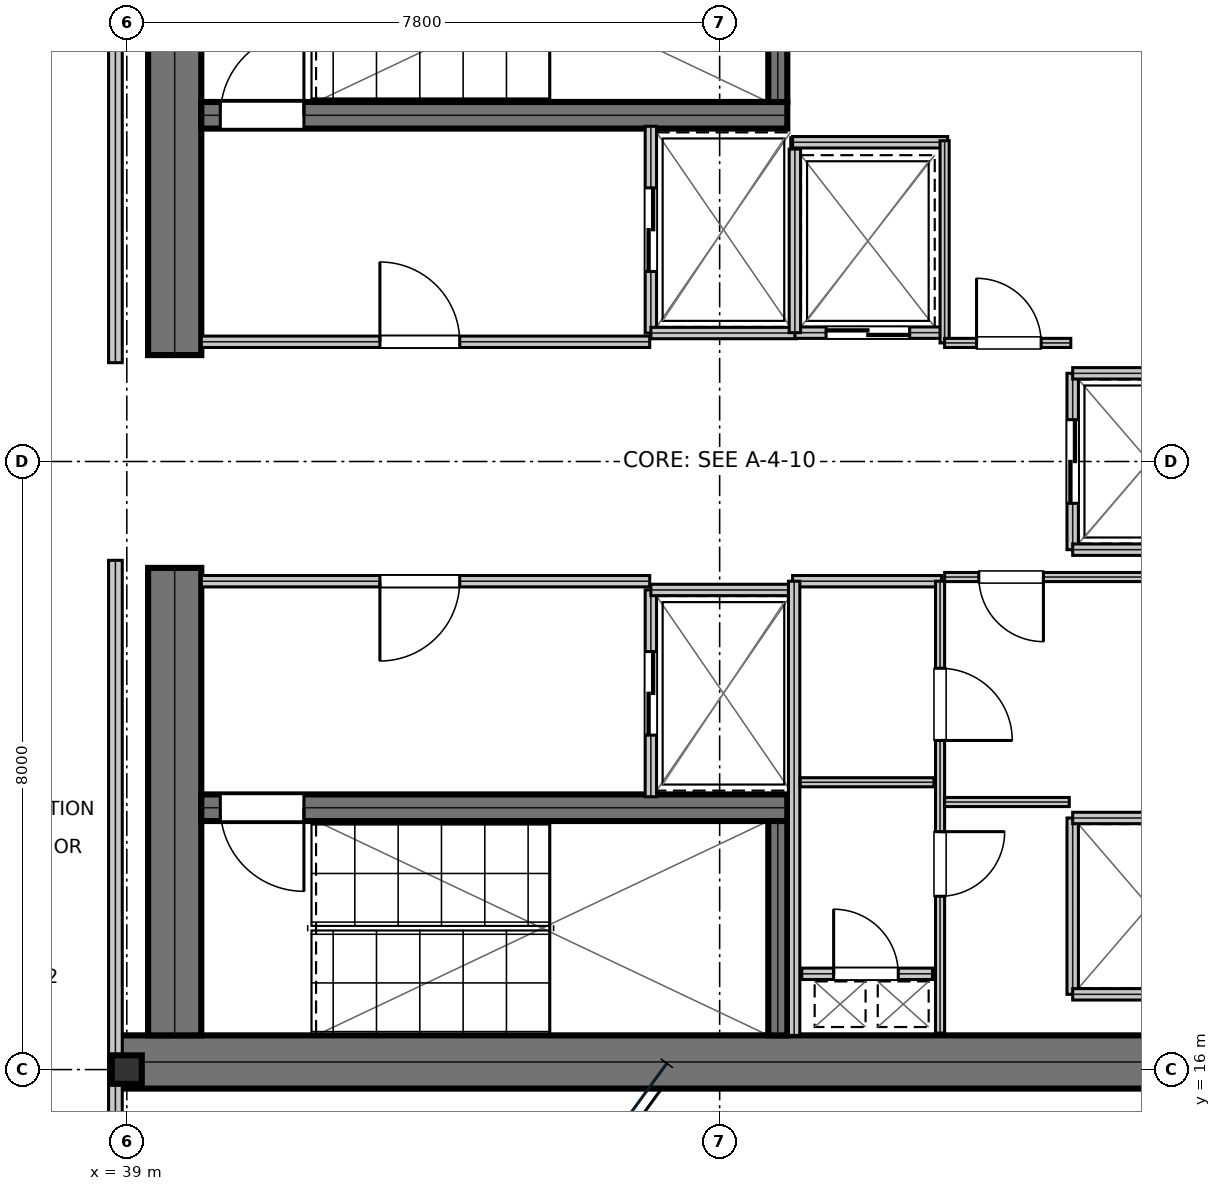
"""IFC4 building model, lengths in metres.
Left out: names, types, materials, properties, quantities, classifications, styles, units other than length and angle.
Written with IfcOpenShell. Run it as: python <this file> out.ifc"""

import sys

from ifc_helpers import new_model, si_unit, direction, frame, frame_2d, origin, origin_2d, place, context, subcontext, project, spatial, rectangle, i_section, extrude, element, fill, save


model = new_model("IFC4")
c1 = context("Model", 3, precision=1e-05, world=origin(), true_north=direction((0.0, 1.0)))
c2 = subcontext(c1, "Body", "Model", "MODEL_VIEW")
j1 = project(units=[si_unit("LENGTHUNIT", "METRE"), si_unit("PLANEANGLEUNIT", "RADIAN")], contexts=[c1])
p1 = place(None, origin())
s1 = spatial("IfcSite", under=j1, at=p1, CompositionType="ELEMENT")
p2 = place(p1, origin())
s2 = spatial("IfcBuilding", under=s1, at=p2, CompositionType="ELEMENT")
p3 = place(p2, frame((0.0, 0.0, 228.3)))
s3 = spatial("IfcBuildingStorey", under=s2, at=p3, CompositionType="ELEMENT", Elevation=228.3)
p4 = place(p3, frame((38.8, 16.1, 0.0), z_axis=(0.0, 0.0, 1.0), x_axis=(1.0, 0.0, 0.0)))
e1 = element("IfcWall", 1, at=p4, inside=s3, PredefinedType="SHEAR", context=c2, shape_type="SweptSolid", body=[
    extrude(rectangle(XDim=16.0, YDim=0.7, at=frame_2d((8.0, 0.0))), origin(), (0.0, 0.0, 1.0), 3.79),
])
for number, where, z_axis, x_axis in (
    (2, (39.63, 16.45, 0.0), (0.0, 0.0, 1.0), (0.0, 1.0, 0.0)),
    (3, (39.63, 25.4, 0.0), (0.0, 0.0, 1.0), (0.0, 1.0, 0.0)),
):
    element("IfcWall", number, at=place(p3, frame(where, z_axis=z_axis, x_axis=x_axis)), inside=s3, PredefinedType="SHEAR", context=c2, shape_type="SweptSolid", body=[
        extrude(rectangle(XDim=6.15, YDim=0.7, at=frame_2d((3.075, 0.0))), origin(), (0.0, 0.0, 1.0), 3.79),
    ])
p5 = place(p3, frame((39.98, 28.555, 0.0), z_axis=(0.0, 0.0, 1.0), x_axis=(1.0, 0.0, 0.0)))
e4 = element("IfcWall", 4, at=p5, inside=s3, PredefinedType="SHEAR", context=c2, shape_type="SweptSolid", body=[
    extrude(rectangle(XDim=7.71, YDim=0.35, at=frame_2d((3.855, 0.0))), origin(), (0.0, 0.0, 1.0), 3.79),
])
p6 = place(p5, frame((0.25, 0.0, 0.0)))
e5 = element("IfcOpeningElement", 5, at=p6, cuts=e4, PredefinedType="OPENING", context=c2, shape_type="SweptSolid", body=[
    extrude(rectangle(XDim=1.1, YDim=2.15, at=frame_2d((0.55, 1.075))), frame((0.0, 0.185, 0.0), z_axis=(0.0, -1.0, 0.0), x_axis=(1.0, 0.0, 0.0)), (0.0, 0.0, 1.0), 0.37),
])
p7 = place(p3, frame((39.98, 19.445, 0.0), z_axis=(0.0, 0.0, 1.0), x_axis=(1.0, 0.0, 0.0)))
e6 = element("IfcWall", 6, at=p7, inside=s3, PredefinedType="SHEAR", context=c2, shape_type="SweptSolid", body=[
    extrude(rectangle(XDim=7.71, YDim=0.35, at=frame_2d((3.855, 0.0))), origin(), (0.0, 0.0, 1.0), 3.79),
])
p8 = place(p7, frame((0.25, 0.0, 0.0)))
e7 = element("IfcOpeningElement", 7, at=p8, cuts=e6, PredefinedType="OPENING", context=c2, shape_type="SweptSolid", body=[
    extrude(rectangle(XDim=1.1, YDim=2.15, at=frame_2d((0.55, 1.075))), frame((0.0, 0.185, 0.0), z_axis=(0.0, -1.0, 0.0), x_axis=(1.0, 0.0, 0.0)), (0.0, 0.0, 1.0), 0.37),
])
for number, where, z_axis, x_axis in (
    (8, (47.565, 28.73, 0.0), (0.0, 0.0, 1.0), (0.0, 1.0, 0.0)),
    (9, (47.565, 16.45, 0.0), (0.0, 0.0, 1.0), (0.0, 1.0, 0.0)),
):
    element("IfcWall", number, at=place(p3, frame(where, z_axis=z_axis, x_axis=x_axis)), inside=s3, PredefinedType="SHEAR", context=c2, shape_type="SweptSolid", body=[
        extrude(rectangle(XDim=2.82, YDim=0.25, at=frame_2d((1.41, 0.0))), origin(), (0.0, 0.0, 1.0), 3.79),
    ])
p9 = place(p3, frame((39.0, 16.0, 0.0), z_axis=(0.0, 0.0, 1.0), x_axis=(1.0, 0.0, 0.0)))
e10 = element("IfcColumn", 10, at=p9, inside=s3, PredefinedType="COLUMN", context=c2, shape_type="SweptSolid", body=[
    extrude(i_section(OverallWidth=0.394, OverallDepth=0.375, WebThickness=0.017, FlangeThickness=0.028, at=origin_2d()), origin(), (0.0, 0.0, 1.0), 4.044),
])
p10 = place(p3, frame((39.98, 25.575, 0.0), z_axis=(0.0, 0.0, 1.0), x_axis=(1.0, 0.0, 0.0)))
e11 = element("IfcWall", 11, at=p10, inside=s3, PredefinedType="PARTITIONING", context=c2, shape_type="SweptSolid", body=[
    extrude(rectangle(XDim=5.9, YDim=0.15, at=frame_2d((2.95, 0.0))), origin(), (0.0, 0.0, 1.0), 3.79),
])
p11 = place(p10, frame((2.35, 0.0, 0.0)))
e12 = element("IfcOpeningElement", 12, at=p11, cuts=e11, PredefinedType="OPENING", context=c2, shape_type="SweptSolid", body=[
    extrude(rectangle(XDim=1.05, YDim=2.15, at=frame_2d((0.525, 1.075))), frame((0.0, 0.085, 0.0), z_axis=(0.0, -1.0, 0.0), x_axis=(1.0, 0.0, 0.0)), (0.0, 0.0, 1.0), 0.17),
])
p12 = place(p3, frame((39.98, 22.425, 0.0), z_axis=(0.0, 0.0, 1.0), x_axis=(1.0, 0.0, 0.0)))
e13 = element("IfcWall", 13, at=p12, inside=s3, PredefinedType="PARTITIONING", context=c2, shape_type="SweptSolid", body=[
    extrude(rectangle(XDim=5.9, YDim=0.15, at=frame_2d((2.95, 0.0))), origin(), (0.0, 0.0, 1.0), 3.79),
])
p13 = place(p12, frame((2.35, 0.0, 0.0)))
e14 = element("IfcOpeningElement", 14, at=p13, cuts=e13, PredefinedType="OPENING", context=c2, shape_type="SweptSolid", body=[
    extrude(rectangle(XDim=1.05, YDim=2.15, at=frame_2d((0.525, 1.075))), frame((0.0, 0.085, 0.0), z_axis=(0.0, -1.0, 0.0), x_axis=(1.0, 0.0, 0.0)), (0.0, 0.0, 1.0), 0.17),
])
p14 = place(p3, frame((45.895, 25.69, 0.0), z_axis=(0.0, 0.0, 1.0), x_axis=(0.0, 1.0, 0.0)))
e15 = element("IfcWall", 15, at=p14, inside=s3, PredefinedType="PARTITIONING", context=c2, shape_type="SweptSolid", body=[
    extrude(rectangle(XDim=2.72, YDim=0.15, at=frame_2d((1.36, 0.0))), origin(), (0.0, 0.0, 1.0), 3.79),
])
p15 = place(p14, frame((0.81, 0.0, 0.0)))
e16 = element("IfcOpeningElement", 16, at=p15, cuts=e15, PredefinedType="OPENING", context=c2, shape_type="SweptSolid", body=[
    extrude(rectangle(XDim=1.1, YDim=2.15, at=frame_2d((0.55, 1.075))), frame((0.0, 0.085, 0.0), z_axis=(0.0, -1.0, 0.0), x_axis=(1.0, 0.0, 0.0)), (0.0, 0.0, 1.0), 0.17),
])
p16 = place(p3, frame((45.895, 25.69, 0.0), z_axis=(0.0, 0.0, 1.0), x_axis=(1.0, 0.0, 0.0)))
e17 = element("IfcWall", 17, at=p16, inside=s3, PredefinedType="PARTITIONING", context=c2, shape_type="SweptSolid", body=[
    extrude(rectangle(XDim=1.915, YDim=0.15, at=frame_2d((0.958, 0.0))), origin(), (0.0, 0.0, 1.0), 3.79),
])
p17 = place(p3, frame((45.895, 19.59, 0.0), z_axis=(0.0, 0.0, 1.0), x_axis=(0.0, 1.0, 0.0)))
e18 = element("IfcWall", 18, at=p17, inside=s3, PredefinedType="PARTITIONING", context=c2, shape_type="SweptSolid", body=[
    extrude(rectangle(XDim=2.72, YDim=0.15, at=frame_2d((1.36, 0.0))), origin(), (0.0, 0.0, 1.0), 3.79),
])
p18 = place(p17, frame((0.81, 0.0, 0.0)))
e19 = element("IfcOpeningElement", 19, at=p18, cuts=e18, PredefinedType="OPENING", context=c2, shape_type="SweptSolid", body=[
    extrude(rectangle(XDim=1.1, YDim=2.15, at=frame_2d((0.55, 1.075))), frame((0.0, 0.085, 0.0), z_axis=(0.0, -1.0, 0.0), x_axis=(1.0, 0.0, 0.0)), (0.0, 0.0, 1.0), 0.17),
])
p19 = place(p3, frame((45.895, 22.31, 0.0), z_axis=(0.0, 0.0, 1.0), x_axis=(1.0, 0.0, 0.0)))
e20 = element("IfcWall", 20, at=p19, inside=s3, PredefinedType="PARTITIONING", context=c2, shape_type="SweptSolid", body=[
    extrude(rectangle(XDim=1.915, YDim=0.15, at=frame_2d((0.958, 0.0))), origin(), (0.0, 0.0, 1.0), 3.79),
])
p20 = place(p3, frame((47.79, 25.695, 0.0), z_axis=(0.0, 0.0, 1.0), x_axis=(1.0, 0.0, 0.0)))
e21 = element("IfcWall", 21, at=p20, inside=s3, PredefinedType="PARTITIONING", context=c2, shape_type="SweptSolid", body=[
    extrude(rectangle(XDim=1.92, YDim=0.15, at=frame_2d((0.96, 0.0))), origin(), (0.0, 0.0, 1.0), 3.79),
])
p21 = place(p20, frame((0.41, 0.0, 0.0)))
e22 = element("IfcOpeningElement", 22, at=p21, cuts=e21, PredefinedType="OPENING", context=c2, shape_type="SweptSolid", body=[
    extrude(rectangle(XDim=1.1, YDim=2.15, at=frame_2d((0.55, 1.075))), frame((0.0, 0.085, 0.0), z_axis=(0.0, -1.0, 0.0), x_axis=(1.0, 0.0, 0.0)), (0.0, 0.0, 1.0), 0.17),
])
p22 = place(p3, frame((47.79, 25.695, 0.0), z_axis=(0.0, 0.0, 1.0), x_axis=(0.0, 1.0, 0.0)))
e23 = element("IfcWall", 23, at=p22, inside=s3, PredefinedType="PARTITIONING", context=c2, shape_type="SweptSolid", body=[
    extrude(rectangle(XDim=2.415, YDim=0.15, at=frame_2d((1.208, 0.0))), origin(), (0.0, 0.0, 1.0), 3.79),
])
p23 = place(p3, frame((51.445, 22.84, 0.0), z_axis=(0.0, 0.0, 1.0), x_axis=(0.0, 1.0, 0.0)))
e24 = element("IfcWall", 24, at=p23, inside=s3, PredefinedType="PARTITIONING", context=c2, shape_type="SweptSolid", body=[
    extrude(rectangle(XDim=2.32, YDim=0.15, at=frame_2d((1.16, 0.0))), origin(), (0.0, 0.0, 1.0), 3.79),
])
p24 = place(p23, frame((0.61, 0.0, 0.0)))
e25 = element("IfcOpeningElement", 25, at=p24, cuts=e24, PredefinedType="OPENING", context=c2, shape_type="SweptSolid", body=[
    extrude(rectangle(XDim=1.1, YDim=2.15, at=frame_2d((0.55, 1.075))), frame((0.0, 0.085, 0.0), z_axis=(0.0, -1.0, 0.0), x_axis=(1.0, 0.0, 0.0)), (0.0, 0.0, 1.0), 0.17),
])
for number, where, z_axis, x_axis in (
    (26, (51.445, 22.84, 0.0), (0.0, 0.0, 1.0), (1.0, 0.0, 0.0)),
    (27, (51.445, 25.16, 0.0), (0.0, 0.0, 1.0), (1.0, 0.0, 0.0)),
):
    element("IfcWall", number, at=place(p3, frame(where, z_axis=z_axis, x_axis=x_axis)), inside=s3, PredefinedType="PARTITIONING", context=c2, shape_type="SweptSolid", body=[
        extrude(rectangle(XDim=2.015, YDim=0.15, at=frame_2d((1.007, 0.0))), origin(), (0.0, 0.0, 1.0), 3.79),
    ])
p25 = place(p3, frame((51.445, 16.99, 0.0), z_axis=(0.0, 0.0, 1.0), x_axis=(0.0, 1.0, 0.0)))
e28 = element("IfcWall", 28, at=p25, inside=s3, PredefinedType="PARTITIONING", context=c2, shape_type="SweptSolid", body=[
    extrude(rectangle(XDim=2.32, YDim=0.15, at=frame_2d((1.16, 0.0))), origin(), (0.0, 0.0, 1.0), 3.79),
])
for number, where, z_axis, x_axis in (
    (29, (51.445, 16.99, 0.0), (0.0, 0.0, 1.0), (1.0, 0.0, 0.0)),
    (30, (51.445, 19.31, 0.0), (0.0, 0.0, 1.0), (1.0, 0.0, 0.0)),
):
    element("IfcWall", number, at=place(p3, frame(where, z_axis=z_axis, x_axis=x_axis)), inside=s3, PredefinedType="PARTITIONING", context=c2, shape_type="SweptSolid", body=[
        extrude(rectangle(XDim=2.015, YDim=0.15, at=frame_2d((1.007, 0.0))), origin(), (0.0, 0.0, 1.0), 3.79),
    ])
p26 = place(p3, frame((47.88, 17.26, 0.0), z_axis=(0.0, 0.0, 1.0), x_axis=(1.0, 0.0, 0.0)))
e31 = element("IfcWall", 31, at=p26, inside=s3, PredefinedType="PARTITIONING", context=c2, shape_type="SweptSolid", body=[
    extrude(rectangle(XDim=1.72, YDim=0.15, at=frame_2d((0.86, 0.0))), origin(), (0.0, 0.0, 1.0), 3.79),
])
p27 = place(p26, frame((0.42, 0.0, 0.0)))
e32 = element("IfcOpeningElement", 32, at=p27, cuts=e31, PredefinedType="OPENING", context=c2, shape_type="SweptSolid", body=[
    extrude(rectangle(XDim=0.85, YDim=2.15, at=frame_2d((0.425, 1.075))), frame((0.0, 0.085, 0.0), z_axis=(0.0, -1.0, 0.0), x_axis=(1.0, 0.0, 0.0)), (0.0, 0.0, 1.0), 0.17),
])
p28 = place(p3, frame((47.76, 22.425, 0.0), z_axis=(0.0, 0.0, 1.0), x_axis=(1.0, 0.0, 0.0)))
e33 = element("IfcWall", 33, at=p28, inside=s3, PredefinedType="PARTITIONING", context=c2, shape_type="SweptSolid", body=[
    extrude(rectangle(XDim=1.96, YDim=0.15, at=frame_2d((0.98, 0.0))), origin(), (0.0, 0.0, 1.0), 3.79),
])
p29 = place(p3, frame((47.78, 16.45, 0.0), z_axis=(0.0, 0.0, 1.0), x_axis=(0.0, 1.0, 0.0)))
e34 = element("IfcWall", 34, at=p29, inside=s3, PredefinedType="PARTITIONING", context=c2, shape_type="SweptSolid", body=[
    extrude(rectangle(XDim=5.975, YDim=0.15, at=frame_2d((2.988, 0.0))), origin(), (0.0, 0.0, 1.0), 3.79),
])
p30 = place(p3, frame((47.86, 19.78, 0.0), z_axis=(0.0, 0.0, 1.0), x_axis=(1.0, 0.0, 0.0)))
e35 = element("IfcWall", 35, at=p30, inside=s3, PredefinedType="PARTITIONING", context=c2, shape_type="SweptSolid", body=[
    extrude(rectangle(XDim=1.76, YDim=0.12, at=frame_2d((0.88, 0.0))), origin(), (0.0, 0.0, 1.0), 3.79),
])
p31 = place(p3, frame((49.7, 16.48, 0.0), z_axis=(0.0, 0.0, 1.0), x_axis=(0.0, 1.0, 0.0)))
e36 = element("IfcWall", 36, at=p31, inside=s3, PredefinedType="PARTITIONING", context=c2, shape_type="SweptSolid", body=[
    extrude(rectangle(XDim=5.945, YDim=0.12, at=frame_2d((2.973, 0.0))), origin(), (0.0, 0.0, 1.0), 3.79),
])
p32 = place(p31, frame((1.8, 0.0, 0.0)))
e37 = element("IfcOpeningElement", 37, at=p32, cuts=e36, PredefinedType="OPENING", context=c2, shape_type="SweptSolid", body=[
    extrude(rectangle(XDim=0.85, YDim=2.15, at=frame_2d((0.425, 1.075))), frame((0.0, 0.07, 0.0), z_axis=(0.0, -1.0, 0.0), x_axis=(1.0, 0.0, 0.0)), (0.0, 0.0, 1.0), 0.14),
])
p33 = place(p31, frame((3.85, 0.0, 0.0)))
e38 = element("IfcOpeningElement", 38, at=p33, cuts=e36, PredefinedType="OPENING", context=c2, shape_type="SweptSolid", body=[
    extrude(rectangle(XDim=0.95, YDim=2.15, at=frame_2d((0.475, 1.075))), frame((0.0, 0.07, 0.0), z_axis=(0.0, -1.0, 0.0), x_axis=(1.0, 0.0, 0.0)), (0.0, 0.0, 1.0), 0.14),
])
p34 = place(p3, frame((49.76, 22.48, 0.0), z_axis=(0.0, 0.0, 1.0), x_axis=(1.0, 0.0, 0.0)))
e39 = element("IfcWall", 39, at=p34, inside=s3, PredefinedType="PARTITIONING", context=c2, shape_type="SweptSolid", body=[
    extrude(rectangle(XDim=3.9, YDim=0.12, at=frame_2d((1.95, 0.0))), origin(), (0.0, 0.0, 1.0), 3.79),
])
p35 = place(p34, frame((0.45, 0.0, 0.0)))
e40 = element("IfcOpeningElement", 40, at=p35, cuts=e39, PredefinedType="OPENING", context=c2, shape_type="SweptSolid", body=[
    extrude(rectangle(XDim=0.85, YDim=2.15, at=frame_2d((0.425, 1.075))), frame((0.0, 0.07, 0.0), z_axis=(0.0, -1.0, 0.0), x_axis=(1.0, 0.0, 0.0)), (0.0, 0.0, 1.0), 0.14),
])
p36 = place(p3, frame((49.76, 19.52, 0.0), z_axis=(0.0, 0.0, 1.0), x_axis=(1.0, 0.0, 0.0)))
e41 = element("IfcWall", 41, at=p36, inside=s3, PredefinedType="PARTITIONING", context=c2, shape_type="SweptSolid", body=[
    extrude(rectangle(XDim=1.64, YDim=0.12, at=frame_2d((0.82, 0.0))), origin(), (0.0, 0.0, 1.0), 3.79),
])
p37 = place(p3, frame((47.76, 28.2, 0.0), z_axis=(0.0, 0.0, 1.0), x_axis=(1.0, 0.0, 0.0)))
e42 = element("IfcWall", 42, at=p37, inside=s3, PredefinedType="PARTITIONING", context=c2, shape_type="SweptSolid", body=[
    extrude(rectangle(XDim=2.04, YDim=0.15, at=frame_2d((1.02, 0.0))), origin(), (0.0, 0.0, 1.0), 3.79),
])
p38 = place(p3, frame((49.76, 25.56, 0.0), z_axis=(0.0, 0.0, 1.0), x_axis=(0.0, 1.0, 0.0)))
e43 = element("IfcWall", 43, at=p38, inside=s3, PredefinedType="PARTITIONING", context=c2, shape_type="SweptSolid", body=[
    extrude(rectangle(XDim=2.66, YDim=0.12, at=frame_2d((1.33, 0.0))), origin(), (0.0, 0.0, 1.0), 3.79),
])
p39 = place(p3, frame((49.76, 25.56, 0.0), z_axis=(0.0, 0.0, 1.0), x_axis=(1.0, 0.0, 0.0)))
e44 = element("IfcWall", 44, at=p39, inside=s3, PredefinedType="PARTITIONING", context=c2, shape_type="SweptSolid", body=[
    extrude(rectangle(XDim=1.66, YDim=0.12, at=frame_2d((0.83, 0.0))), origin(), (0.0, 0.0, 1.0), 3.79),
])
p40 = place(p39, frame((0.42, 0.0, 0.0)))
e45 = element("IfcOpeningElement", 45, at=p40, cuts=e44, PredefinedType="OPENING", context=c2, shape_type="SweptSolid", body=[
    extrude(rectangle(XDim=0.85, YDim=2.15, at=frame_2d((0.425, 1.075))), frame((0.0, 0.07, 0.0), z_axis=(0.0, -1.0, 0.0), x_axis=(1.0, 0.0, 0.0)), (0.0, 0.0, 1.0), 0.14),
])
for number, where, z_axis, x_axis in (
    (46, (38.85, 14.5, 0.0), (0.0, 0.0, 1.0), (0.0, 1.0, 0.0)),
    (47, (38.85, 25.3, 0.0), (0.0, 0.0, 1.0), (0.0, 1.0, 0.0)),
):
    element("IfcWall", number, at=place(p3, frame(where, z_axis=z_axis, x_axis=x_axis)), inside=s3, PredefinedType="SOLIDWALL", context=c2, shape_type="SweptSolid", body=[
        extrude(rectangle(XDim=8.2, YDim=0.18, at=frame_2d((4.1, 0.0))), origin(), (0.0, 0.0, 1.0), 3.241),
    ])
p41 = place(p11, origin())
e48 = element("IfcDoor", 48, at=p41, inside=s3, OperationType="SINGLE_SWING_LEFT", PredefinedType="DOOR", context=c2, shape_type="SweptSolid", body=[
    extrude(rectangle(XDim=1.05, YDim=2.15, at=frame_2d((0.525, 1.075))), frame((0.0, 0.025, 0.0), z_axis=(0.0, -1.0, 0.0), x_axis=(1.0, 0.0, 0.0)), (0.0, 0.0, 1.0), 0.05),
])
fill(e12, e48)
p42 = place(p13, frame((1.05, 0.0, 0.0), z_axis=(0.0, 0.0, 1.0), x_axis=(-1.0, 0.0, 0.0)))
e49 = element("IfcDoor", 49, at=p42, inside=s3, OperationType="SINGLE_SWING_RIGHT", PredefinedType="DOOR", context=c2, shape_type="SweptSolid", body=[
    extrude(rectangle(XDim=1.05, YDim=2.15, at=frame_2d((0.525, 1.075))), frame((0.0, 0.025, 0.0), z_axis=(0.0, -1.0, 0.0), x_axis=(1.0, 0.0, 0.0)), (0.0, 0.0, 1.0), 0.05),
])
fill(e14, e49)
p43 = place(p15, frame((1.1, 0.0, 0.0), z_axis=(0.0, 0.0, 1.0), x_axis=(-1.0, 0.0, 0.0)))
e50 = element("IfcDoor", 50, at=p43, inside=s3, OperationType="DOUBLE_DOOR_SLIDING", PredefinedType="DOOR", context=c2, shape_type="SweptSolid", body=[
    extrude(rectangle(XDim=1.1, YDim=2.15, at=frame_2d((0.55, 1.075))), frame((0.0, 0.025, 0.0), z_axis=(0.0, -1.0, 0.0), x_axis=(1.0, 0.0, 0.0)), (0.0, 0.0, 1.0), 0.05),
])
fill(e16, e50)
p44 = place(p18, frame((1.1, 0.0, 0.0), z_axis=(0.0, 0.0, 1.0), x_axis=(-1.0, 0.0, 0.0)))
e51 = element("IfcDoor", 51, at=p44, inside=s3, OperationType="DOUBLE_DOOR_SLIDING", PredefinedType="DOOR", context=c2, shape_type="SweptSolid", body=[
    extrude(rectangle(XDim=1.1, YDim=2.15, at=frame_2d((0.55, 1.075))), frame((0.0, 0.025, 0.0), z_axis=(0.0, -1.0, 0.0), x_axis=(1.0, 0.0, 0.0)), (0.0, 0.0, 1.0), 0.05),
])
fill(e19, e51)
p45 = place(p21, frame((1.1, 0.0, 0.0), z_axis=(0.0, 0.0, 1.0), x_axis=(-1.0, 0.0, 0.0)))
e52 = element("IfcDoor", 52, at=p45, inside=s3, OperationType="DOUBLE_DOOR_SLIDING", PredefinedType="DOOR", context=c2, shape_type="SweptSolid", body=[
    extrude(rectangle(XDim=1.1, YDim=2.15, at=frame_2d((0.55, 1.075))), frame((0.0, 0.025, 0.0), z_axis=(0.0, -1.0, 0.0), x_axis=(1.0, 0.0, 0.0)), (0.0, 0.0, 1.0), 0.05),
])
fill(e22, e52)
p46 = place(p24, frame((1.1, 0.0, 0.0), z_axis=(0.0, 0.0, 1.0), x_axis=(-1.0, 0.0, 0.0)))
e53 = element("IfcDoor", 53, at=p46, inside=s3, OperationType="DOUBLE_DOOR_SLIDING", PredefinedType="DOOR", context=c2, shape_type="SweptSolid", body=[
    extrude(rectangle(XDim=1.1, YDim=2.15, at=frame_2d((0.55, 1.075))), frame((0.0, 0.025, 0.0), z_axis=(0.0, -1.0, 0.0), x_axis=(1.0, 0.0, 0.0)), (0.0, 0.0, 1.0), 0.05),
])
fill(e25, e53)
p47 = place(p27, origin())
e54 = element("IfcDoor", 54, at=p47, inside=s3, OperationType="SINGLE_SWING_LEFT", PredefinedType="TRAPDOOR", context=c2, shape_type="SweptSolid", body=[
    extrude(rectangle(XDim=0.85, YDim=2.15, at=frame_2d((0.425, 1.075))), frame((0.0, 0.025, 0.0), z_axis=(0.0, -1.0, 0.0), x_axis=(1.0, 0.0, 0.0)), (0.0, 0.0, 1.0), 0.05),
])
fill(e32, e54)
p48 = place(p32, frame((0.85, 0.0, 0.0), z_axis=(0.0, 0.0, 1.0), x_axis=(-1.0, 0.0, 0.0)))
e55 = element("IfcDoor", 55, at=p48, inside=s3, OperationType="SINGLE_SWING_LEFT", PredefinedType="DOOR", context=c2, shape_type="SweptSolid", body=[
    extrude(rectangle(XDim=0.85, YDim=2.15, at=frame_2d((0.425, 1.075))), frame((0.0, 0.025, 0.0), z_axis=(0.0, -1.0, 0.0), x_axis=(1.0, 0.0, 0.0)), (0.0, 0.0, 1.0), 0.05),
])
fill(e37, e55)
p49 = place(p33, frame((0.95, 0.0, 0.0), z_axis=(0.0, 0.0, 1.0), x_axis=(-1.0, 0.0, 0.0)))
e56 = element("IfcDoor", 56, at=p49, inside=s3, OperationType="SINGLE_SWING_RIGHT", PredefinedType="DOOR", context=c2, shape_type="SweptSolid", body=[
    extrude(rectangle(XDim=0.95, YDim=2.15, at=frame_2d((0.475, 1.075))), frame((0.0, 0.025, 0.0), z_axis=(0.0, -1.0, 0.0), x_axis=(1.0, 0.0, 0.0)), (0.0, 0.0, 1.0), 0.05),
])
fill(e38, e56)
p50 = place(p35, frame((0.85, 0.0, 0.0), z_axis=(0.0, 0.0, 1.0), x_axis=(-1.0, 0.0, 0.0)))
e57 = element("IfcDoor", 57, at=p50, inside=s3, OperationType="SINGLE_SWING_LEFT", PredefinedType="DOOR", context=c2, shape_type="SweptSolid", body=[
    extrude(rectangle(XDim=0.85, YDim=2.15, at=frame_2d((0.425, 1.075))), frame((0.0, 0.025, 0.0), z_axis=(0.0, -1.0, 0.0), x_axis=(1.0, 0.0, 0.0)), (0.0, 0.0, 1.0), 0.05),
])
fill(e40, e57)
p51 = place(p40, origin())
e58 = element("IfcDoor", 58, at=p51, inside=s3, OperationType="SINGLE_SWING_LEFT", PredefinedType="DOOR", context=c2, shape_type="SweptSolid", body=[
    extrude(rectangle(XDim=0.85, YDim=2.15, at=frame_2d((0.425, 1.075))), frame((0.0, 0.025, 0.0), z_axis=(0.0, -1.0, 0.0), x_axis=(1.0, 0.0, 0.0)), (0.0, 0.0, 1.0), 0.05),
])
fill(e45, e58)
p52 = place(p6, origin())
e59 = element("IfcDoor", 59, at=p52, inside=s3, OperationType="SINGLE_SWING_RIGHT", PredefinedType="DOOR", context=c2, shape_type="SweptSolid", body=[
    extrude(rectangle(XDim=1.1, YDim=2.15, at=frame_2d((0.55, 1.075))), frame((0.0, 0.025, 0.0), z_axis=(0.0, -1.0, 0.0), x_axis=(1.0, 0.0, 0.0)), (0.0, 0.0, 1.0), 0.05),
])
fill(e5, e59)
p53 = place(p8, frame((1.1, 0.0, 0.0), z_axis=(0.0, 0.0, 1.0), x_axis=(-1.0, 0.0, 0.0)))
e60 = element("IfcDoor", 60, at=p53, inside=s3, OperationType="SINGLE_SWING_LEFT", PredefinedType="DOOR", context=c2, shape_type="SweptSolid", body=[
    extrude(rectangle(XDim=1.1, YDim=2.15, at=frame_2d((0.55, 1.075))), frame((0.0, 0.025, 0.0), z_axis=(0.0, -1.0, 0.0), x_axis=(1.0, 0.0, 0.0)), (0.0, 0.0, 1.0), 0.05),
])
fill(e7, e60)
save(model, sys.argv[1])
